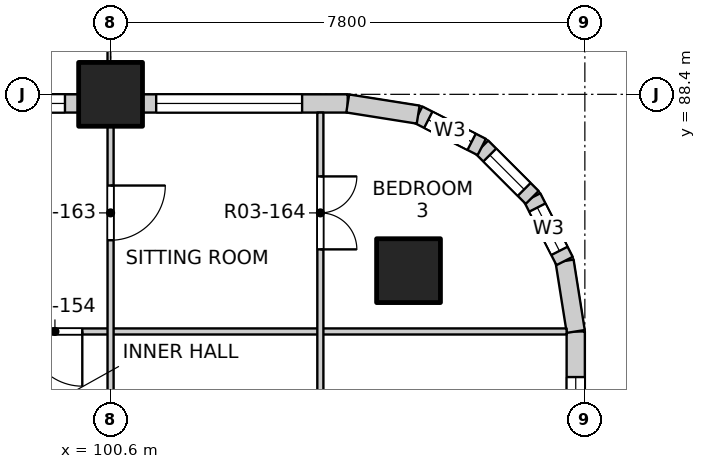
"""IFC4 building model, lengths in metres.
Left out: names, types, materials, properties, quantities, classifications, styles, units other than length and angle.
Written with IfcOpenShell. Run it as: python <this file> out.ifc"""

import sys

from ifc_helpers import new_model, si_unit, direction, frame, frame_2d, origin, origin_2d, place, context, subcontext, project, spatial, rectangle, extrude, element, fill, save


model = new_model("IFC4")
c1 = context("Model", 3, precision=1e-05, world=origin(), true_north=direction((0.0, 1.0)))
c2 = subcontext(c1, "Body", "Model", "MODEL_VIEW")
j1 = project(units=[si_unit("LENGTHUNIT", "METRE"), si_unit("PLANEANGLEUNIT", "RADIAN")], contexts=[c1])
p1 = place(None, origin())
s1 = spatial("IfcSite", under=j1, at=p1, CompositionType="ELEMENT")
p2 = place(p1, origin())
s2 = spatial("IfcBuilding", under=s1, at=p2, CompositionType="ELEMENT")
p3 = place(p2, frame((0.0, 0.0, 43.3)))
s3 = spatial("IfcBuildingStorey", under=s2, at=p3, CompositionType="ELEMENT", Elevation=43.3)
for number, where, z_axis, x_axis in (
    (1, (105.5, 85.5, -0.25), (0.0, 0.0, 1.0), (1.0, 0.0, 0.0)),
    (2, (100.6, 88.4, -0.25), (0.0, 0.0, 1.0), (1.0, 0.0, 0.0)),
):
    element("IfcColumn", number, at=place(p3, frame(where, z_axis=z_axis, x_axis=x_axis)), inside=s3, PredefinedType="COLUMN", context=c2, shape_type="SweptSolid", body=[
        extrude(rectangle(XDim=1.05, YDim=1.05, at=origin_2d()), origin(), (0.0, 0.0, 1.0), 3.35),
    ])
p4 = place(p3, frame((108.25, 81.125, 0.0), z_axis=(0.0, 0.0, 1.0), x_axis=(0.0, 1.0, 0.0)))
e3 = element("IfcWall", 3, at=p4, inside=s3, PredefinedType="SOLIDWALL", context=c2, shape_type="SweptSolid", body=[
    extrude(rectangle(XDim=3.375, YDim=0.3, at=frame_2d((1.688, 0.0))), origin(), (0.0, 0.0, 1.0), 3.1),
])
p5 = place(p4, frame((0.225, 0.0, 0.9)))
e4 = element("IfcOpeningElement", 4, at=p5, cuts=e3, PredefinedType="OPENING", context=c2, shape_type="SweptSolid", body=[
    extrude(rectangle(XDim=2.4, YDim=1.8, at=frame_2d((1.2, 0.9))), frame((0.0, 0.16, 0.0), z_axis=(0.0, -1.0, 0.0), x_axis=(1.0, 0.0, 0.0)), (0.0, 0.0, 1.0), 0.32),
])
p6 = place(p3, frame((93.325, 88.25, 0.0), z_axis=(0.0, 0.0, 1.0), x_axis=(1.0, 0.0, 0.0)))
e5 = element("IfcWall", 5, at=p6, inside=s3, PredefinedType="SOLIDWALL", context=c2, shape_type="SweptSolid", body=[
    extrude(rectangle(XDim=6.75, YDim=0.3, at=frame_2d((3.375, 0.0))), origin(), (0.0, 0.0, 1.0), 3.1),
])
p7 = place(p6, frame((0.525, 0.0, 0.0)))
e6 = element("IfcOpeningElement", 6, at=p7, cuts=e5, PredefinedType="OPENING", context=c2, shape_type="SweptSolid", body=[
    extrude(rectangle(XDim=1.8, YDim=2.4, at=frame_2d((0.9, 1.2))), frame((0.0, 0.16, 0.0), z_axis=(0.0, -1.0, 0.0), x_axis=(1.0, 0.0, 0.0)), (0.0, 0.0, 1.0), 0.32),
])
p8 = place(p6, frame((4.125, 0.0, 0.9)))
e7 = element("IfcOpeningElement", 7, at=p8, cuts=e5, PredefinedType="OPENING", context=c2, shape_type="SweptSolid", body=[
    extrude(rectangle(XDim=2.4, YDim=1.8, at=frame_2d((1.2, 0.9))), frame((0.0, 0.16, 0.0), z_axis=(0.0, -1.0, 0.0), x_axis=(1.0, 0.0, 0.0)), (0.0, 0.0, 1.0), 0.32),
])
p9 = place(p3, frame((101.125, 88.25, 0.0), z_axis=(0.0, 0.0, 1.0), x_axis=(1.0, 0.0, 0.0)))
e8 = element("IfcWall", 8, at=p9, inside=s3, PredefinedType="SOLIDWALL", context=c2, shape_type="SweptSolid", body=[
    extrude(rectangle(XDim=3.375, YDim=0.3, at=frame_2d((1.688, 0.0))), origin(), (0.0, 0.0, 1.0), 3.1),
])
p10 = place(p9, frame((0.225, 0.0, 0.9)))
e9 = element("IfcOpeningElement", 9, at=p10, cuts=e8, PredefinedType="OPENING", context=c2, shape_type="SweptSolid", body=[
    extrude(rectangle(XDim=2.4, YDim=1.8, at=frame_2d((1.2, 0.9))), frame((0.0, 0.16, 0.0), z_axis=(0.0, -1.0, 0.0), x_axis=(1.0, 0.0, 0.0)), (0.0, 0.0, 1.0), 0.32),
])
p11 = place(p3, frame((108.25, 84.5, 0.0), z_axis=(0.0, 0.0, 1.0), x_axis=(-0.156496880861, 0.987678452879, 0.0)))
e10 = element("IfcWall", 10, at=p11, inside=s3, PredefinedType="SOLIDWALL", context=c2, shape_type="SweptSolid", body=[
    extrude(rectangle(XDim=1.173, YDim=0.3, at=frame_2d((0.586, 0.0))), origin(), (0.0, 0.0, 1.0), 3.1),
])
p12 = place(p3, frame((108.066, 85.659, 0.0), z_axis=(0.0, 0.0, 1.0), x_axis=(-0.454025524128, 0.890988677504, 0.0)))
e11 = element("IfcWall", 11, at=p12, inside=s3, PredefinedType="SOLIDWALL", context=c2, shape_type="SweptSolid", body=[
    extrude(rectangle(XDim=1.173, YDim=0.3, at=frame_2d((0.587, 0.0))), origin(), (0.0, 0.0, 1.0), 3.1),
])
p13 = place(p12, frame((0.187, 0.0, 0.9)))
e12 = element("IfcOpeningElement", 12, at=p13, cuts=e11, PredefinedType="OPENING", context=c2, shape_type="SweptSolid", body=[
    extrude(rectangle(XDim=0.8, YDim=1.2, at=frame_2d((0.4, 0.6))), frame((0.0, 0.16, 0.0), z_axis=(0.0, -1.0, 0.0), x_axis=(1.0, 0.0, 0.0)), (0.0, 0.0, 1.0), 0.32),
])
p14 = place(p3, frame((107.534, 86.704, 0.0), z_axis=(0.0, 0.0, 1.0), x_axis=(-0.707106781187, 0.707106781187, 0.0)))
e13 = element("IfcWall", 13, at=p14, inside=s3, PredefinedType="SOLIDWALL", context=c2, shape_type="SweptSolid", body=[
    extrude(rectangle(XDim=1.173, YDim=0.3, at=frame_2d((0.586, 0.0))), origin(), (0.0, 0.0, 1.0), 3.1),
])
p15 = place(p14, frame((0.187, 0.0, 0.9)))
e14 = element("IfcOpeningElement", 14, at=p15, cuts=e13, PredefinedType="OPENING", context=c2, shape_type="SweptSolid", body=[
    extrude(rectangle(XDim=0.8, YDim=1.2, at=frame_2d((0.4, 0.6))), frame((0.0, 0.16, 0.0), z_axis=(0.0, -1.0, 0.0), x_axis=(1.0, 0.0, 0.0)), (0.0, 0.0, 1.0), 0.32),
])
p16 = place(p3, frame((106.704, 87.534, 0.0), z_axis=(0.0, 0.0, 1.0), x_axis=(-0.890988677504, 0.454025524128, 0.0)))
e15 = element("IfcWall", 15, at=p16, inside=s3, PredefinedType="SOLIDWALL", context=c2, shape_type="SweptSolid", body=[
    extrude(rectangle(XDim=1.173, YDim=0.3, at=frame_2d((0.587, 0.0))), origin(), (0.0, 0.0, 1.0), 3.1),
])
p17 = place(p16, frame((0.187, 0.0, 0.9)))
e16 = element("IfcOpeningElement", 16, at=p17, cuts=e15, PredefinedType="OPENING", context=c2, shape_type="SweptSolid", body=[
    extrude(rectangle(XDim=0.8, YDim=1.2, at=frame_2d((0.4, 0.6))), frame((0.0, 0.16, 0.0), z_axis=(0.0, -1.0, 0.0), x_axis=(1.0, 0.0, 0.0)), (0.0, 0.0, 1.0), 0.32),
])
p18 = place(p3, frame((105.659, 88.066, 0.0), z_axis=(0.0, 0.0, 1.0), x_axis=(-0.987678452879, 0.156496880861, 0.0)))
e17 = element("IfcWall", 17, at=p18, inside=s3, PredefinedType="SOLIDWALL", context=c2, shape_type="SweptSolid", body=[
    extrude(rectangle(XDim=1.173, YDim=0.3, at=frame_2d((0.586, 0.0))), origin(), (0.0, 0.0, 1.0), 3.1),
])
p19 = place(p3, frame((96.6, 84.5, 0.0), z_axis=(0.0, 0.0, 1.0), x_axis=(1.0, 0.0, 0.0)))
e18 = element("IfcWall", 18, at=p19, inside=s3, PredefinedType="PARTITIONING", context=c2, shape_type="SweptSolid", body=[
    extrude(rectangle(XDim=11.5, YDim=0.1, at=frame_2d((5.75, 0.0))), origin(), (0.0, 0.0, 1.0), 3.1),
])
p20 = place(p19, frame((2.635, 0.0, 0.0)))
e19 = element("IfcOpeningElement", 19, at=p20, cuts=e18, PredefinedType="OPENING", context=c2, shape_type="SweptSolid", body=[
    extrude(rectangle(XDim=0.9, YDim=2.1, at=frame_2d((0.45, 1.05))), frame((0.0, 0.06, 0.0), z_axis=(0.0, -1.0, 0.0), x_axis=(1.0, 0.0, 0.0)), (0.0, 0.0, 1.0), 0.12),
])
p21 = place(p3, frame((100.6, 41.9, 0.0), z_axis=(0.0, 0.0, 1.0), x_axis=(0.0, 1.0, 0.0)))
e20 = element("IfcWall", 20, at=p21, inside=s3, PredefinedType="PARTITIONING", context=c2, shape_type="SweptSolid", body=[
    extrude(rectangle(XDim=46.2, YDim=0.1, at=frame_2d((23.1, 0.0))), origin(), (0.0, 0.0, 1.0), 3.1),
])
p22 = place(p21, frame((1.2, 0.0, 0.0)))
e21 = element("IfcOpeningElement", 21, at=p22, cuts=e20, PredefinedType="OPENING", context=c2, shape_type="SweptSolid", body=[
    extrude(rectangle(XDim=0.9, YDim=2.1, at=frame_2d((0.45, 1.05))), frame((0.0, 0.06, 0.0), z_axis=(0.0, -1.0, 0.0), x_axis=(1.0, 0.0, 0.0)), (0.0, 0.0, 1.0), 0.12),
])
p23 = place(p21, frame((5.9, 0.0, 0.0)))
e22 = element("IfcOpeningElement", 22, at=p23, cuts=e20, PredefinedType="OPENING", context=c2, shape_type="SweptSolid", body=[
    extrude(rectangle(XDim=0.9, YDim=2.1, at=frame_2d((0.45, 1.05))), frame((0.0, 0.06, 0.0), z_axis=(0.0, -1.0, 0.0), x_axis=(1.0, 0.0, 0.0)), (0.0, 0.0, 1.0), 0.12),
])
p24 = place(p21, frame((9.0, 0.0, 0.0)))
e23 = element("IfcOpeningElement", 23, at=p24, cuts=e20, PredefinedType="OPENING", context=c2, shape_type="SweptSolid", body=[
    extrude(rectangle(XDim=0.9, YDim=2.1, at=frame_2d((0.45, 1.05))), frame((0.0, 0.06, 0.0), z_axis=(0.0, -1.0, 0.0), x_axis=(1.0, 0.0, 0.0)), (0.0, 0.0, 1.0), 0.12),
])
p25 = place(p21, frame((13.725, 0.0, 0.0)))
e24 = element("IfcOpeningElement", 24, at=p25, cuts=e20, PredefinedType="OPENING", context=c2, shape_type="SweptSolid", body=[
    extrude(rectangle(XDim=0.9, YDim=2.1, at=frame_2d((0.45, 1.05))), frame((0.0, 0.06, 0.0), z_axis=(0.0, -1.0, 0.0), x_axis=(1.0, 0.0, 0.0)), (0.0, 0.0, 1.0), 0.12),
])
p26 = place(p21, frame((17.775, 0.0, 0.0)))
e25 = element("IfcOpeningElement", 25, at=p26, cuts=e20, PredefinedType="OPENING", context=c2, shape_type="SweptSolid", body=[
    extrude(rectangle(XDim=0.9, YDim=2.1, at=frame_2d((0.45, 1.05))), frame((0.0, 0.06, 0.0), z_axis=(0.0, -1.0, 0.0), x_axis=(1.0, 0.0, 0.0)), (0.0, 0.0, 1.0), 0.12),
])
p27 = place(p21, frame((21.5, 0.0, 0.0)))
e26 = element("IfcOpeningElement", 26, at=p27, cuts=e20, PredefinedType="OPENING", context=c2, shape_type="SweptSolid", body=[
    extrude(rectangle(XDim=0.9, YDim=2.1, at=frame_2d((0.45, 1.05))), frame((0.0, 0.06, 0.0), z_axis=(0.0, -1.0, 0.0), x_axis=(1.0, 0.0, 0.0)), (0.0, 0.0, 1.0), 0.12),
])
p28 = place(p21, frame((24.6, 0.0, 0.0)))
e27 = element("IfcOpeningElement", 27, at=p28, cuts=e20, PredefinedType="OPENING", context=c2, shape_type="SweptSolid", body=[
    extrude(rectangle(XDim=0.9, YDim=2.1, at=frame_2d((0.45, 1.05))), frame((0.0, 0.06, 0.0), z_axis=(0.0, -1.0, 0.0), x_axis=(1.0, 0.0, 0.0)), (0.0, 0.0, 1.0), 0.12),
])
p29 = place(p21, frame((28.5, 0.0, 0.0)))
e28 = element("IfcOpeningElement", 28, at=p29, cuts=e20, PredefinedType="OPENING", context=c2, shape_type="SweptSolid", body=[
    extrude(rectangle(XDim=0.9, YDim=2.1, at=frame_2d((0.45, 1.05))), frame((0.0, 0.06, 0.0), z_axis=(0.0, -1.0, 0.0), x_axis=(1.0, 0.0, 0.0)), (0.0, 0.0, 1.0), 0.12),
])
p30 = place(p21, frame((33.375, 0.0, 0.0)))
e29 = element("IfcOpeningElement", 29, at=p30, cuts=e20, PredefinedType="OPENING", context=c2, shape_type="SweptSolid", body=[
    extrude(rectangle(XDim=0.9, YDim=2.1, at=frame_2d((0.45, 1.05))), frame((0.0, 0.06, 0.0), z_axis=(0.0, -1.0, 0.0), x_axis=(1.0, 0.0, 0.0)), (0.0, 0.0, 1.0), 0.12),
])
p31 = place(p21, frame((37.1, 0.0, 0.0)))
e30 = element("IfcOpeningElement", 30, at=p31, cuts=e20, PredefinedType="OPENING", context=c2, shape_type="SweptSolid", body=[
    extrude(rectangle(XDim=0.9, YDim=2.1, at=frame_2d((0.45, 1.05))), frame((0.0, 0.06, 0.0), z_axis=(0.0, -1.0, 0.0), x_axis=(1.0, 0.0, 0.0)), (0.0, 0.0, 1.0), 0.12),
])
p32 = place(p21, frame((40.2, 0.0, 0.0)))
e31 = element("IfcOpeningElement", 31, at=p32, cuts=e20, PredefinedType="OPENING", context=c2, shape_type="SweptSolid", body=[
    extrude(rectangle(XDim=0.9, YDim=2.1, at=frame_2d((0.45, 1.05))), frame((0.0, 0.06, 0.0), z_axis=(0.0, -1.0, 0.0), x_axis=(1.0, 0.0, 0.0)), (0.0, 0.0, 1.0), 0.12),
])
p33 = place(p21, frame((44.1, 0.0, 0.0)))
e32 = element("IfcOpeningElement", 32, at=p33, cuts=e20, PredefinedType="OPENING", context=c2, shape_type="SweptSolid", body=[
    extrude(rectangle(XDim=0.9, YDim=2.1, at=frame_2d((0.45, 1.05))), frame((0.0, 0.06, 0.0), z_axis=(0.0, -1.0, 0.0), x_axis=(1.0, 0.0, 0.0)), (0.0, 0.0, 1.0), 0.12),
])
p34 = place(p3, frame((104.05, 41.9, 0.0), z_axis=(0.0, 0.0, 1.0), x_axis=(0.0, 1.0, 0.0)))
e33 = element("IfcWall", 33, at=p34, inside=s3, PredefinedType="PARTITIONING", context=c2, shape_type="SweptSolid", body=[
    extrude(rectangle(XDim=46.2, YDim=0.1, at=frame_2d((23.1, 0.0))), origin(), (0.0, 0.0, 1.0), 3.1),
])
p35 = place(p34, frame((1.05, 0.0, 0.0)))
e34 = element("IfcOpeningElement", 34, at=p35, cuts=e33, PredefinedType="OPENING", context=c2, shape_type="SweptSolid", body=[
    extrude(rectangle(XDim=1.2, YDim=2.1, at=frame_2d((0.6, 1.05))), frame((0.0, 0.06, 0.0), z_axis=(0.0, -1.0, 0.0), x_axis=(1.0, 0.0, 0.0)), (0.0, 0.0, 1.0), 0.12),
])
p36 = place(p34, frame((4.125, 0.0, 0.0)))
e35 = element("IfcOpeningElement", 35, at=p36, cuts=e33, PredefinedType="OPENING", context=c2, shape_type="SweptSolid", body=[
    extrude(rectangle(XDim=0.9, YDim=2.1, at=frame_2d((0.45, 1.05))), frame((0.0, 0.06, 0.0), z_axis=(0.0, -1.0, 0.0), x_axis=(1.0, 0.0, 0.0)), (0.0, 0.0, 1.0), 0.12),
])
p37 = place(p34, frame((6.075, 0.0, 0.0)))
e36 = element("IfcOpeningElement", 36, at=p37, cuts=e33, PredefinedType="OPENING", context=c2, shape_type="SweptSolid", body=[
    extrude(rectangle(XDim=0.9, YDim=2.1, at=frame_2d((0.45, 1.05))), frame((0.0, 0.06, 0.0), z_axis=(0.0, -1.0, 0.0), x_axis=(1.0, 0.0, 0.0)), (0.0, 0.0, 1.0), 0.12),
])
p38 = place(p34, frame((8.85, 0.0, 0.0)))
e37 = element("IfcOpeningElement", 37, at=p38, cuts=e33, PredefinedType="OPENING", context=c2, shape_type="SweptSolid", body=[
    extrude(rectangle(XDim=1.2, YDim=2.1, at=frame_2d((0.6, 1.05))), frame((0.0, 0.06, 0.0), z_axis=(0.0, -1.0, 0.0), x_axis=(1.0, 0.0, 0.0)), (0.0, 0.0, 1.0), 0.12),
])
p39 = place(p34, frame((11.925, 0.0, 0.0)))
e38 = element("IfcOpeningElement", 38, at=p39, cuts=e33, PredefinedType="OPENING", context=c2, shape_type="SweptSolid", body=[
    extrude(rectangle(XDim=0.9, YDim=2.1, at=frame_2d((0.45, 1.05))), frame((0.0, 0.06, 0.0), z_axis=(0.0, -1.0, 0.0), x_axis=(1.0, 0.0, 0.0)), (0.0, 0.0, 1.0), 0.12),
])
p40 = place(p34, frame((13.875, 0.0, 0.0)))
e39 = element("IfcOpeningElement", 39, at=p40, cuts=e33, PredefinedType="OPENING", context=c2, shape_type="SweptSolid", body=[
    extrude(rectangle(XDim=0.9, YDim=2.1, at=frame_2d((0.45, 1.05))), frame((0.0, 0.06, 0.0), z_axis=(0.0, -1.0, 0.0), x_axis=(1.0, 0.0, 0.0)), (0.0, 0.0, 1.0), 0.12),
])
p41 = place(p34, frame((15.825, 0.0, 0.0)))
e40 = element("IfcOpeningElement", 40, at=p41, cuts=e33, PredefinedType="OPENING", context=c2, shape_type="SweptSolid", body=[
    extrude(rectangle(XDim=0.9, YDim=2.1, at=frame_2d((0.45, 1.05))), frame((0.0, 0.06, 0.0), z_axis=(0.0, -1.0, 0.0), x_axis=(1.0, 0.0, 0.0)), (0.0, 0.0, 1.0), 0.12),
])
p42 = place(p34, frame((17.775, 0.0, 0.0)))
e41 = element("IfcOpeningElement", 41, at=p42, cuts=e33, PredefinedType="OPENING", context=c2, shape_type="SweptSolid", body=[
    extrude(rectangle(XDim=0.9, YDim=2.1, at=frame_2d((0.45, 1.05))), frame((0.0, 0.06, 0.0), z_axis=(0.0, -1.0, 0.0), x_axis=(1.0, 0.0, 0.0)), (0.0, 0.0, 1.0), 0.12),
])
p43 = place(p34, frame((19.725, 0.0, 0.0)))
e42 = element("IfcOpeningElement", 42, at=p43, cuts=e33, PredefinedType="OPENING", context=c2, shape_type="SweptSolid", body=[
    extrude(rectangle(XDim=0.9, YDim=2.1, at=frame_2d((0.45, 1.05))), frame((0.0, 0.06, 0.0), z_axis=(0.0, -1.0, 0.0), x_axis=(1.0, 0.0, 0.0)), (0.0, 0.0, 1.0), 0.12),
])
p44 = place(p34, frame((21.675, 0.0, 0.0)))
e43 = element("IfcOpeningElement", 43, at=p44, cuts=e33, PredefinedType="OPENING", context=c2, shape_type="SweptSolid", body=[
    extrude(rectangle(XDim=0.9, YDim=2.1, at=frame_2d((0.45, 1.05))), frame((0.0, 0.06, 0.0), z_axis=(0.0, -1.0, 0.0), x_axis=(1.0, 0.0, 0.0)), (0.0, 0.0, 1.0), 0.12),
])
p45 = place(p34, frame((24.45, 0.0, 0.0)))
e44 = element("IfcOpeningElement", 44, at=p45, cuts=e33, PredefinedType="OPENING", context=c2, shape_type="SweptSolid", body=[
    extrude(rectangle(XDim=1.2, YDim=2.1, at=frame_2d((0.6, 1.05))), frame((0.0, 0.06, 0.0), z_axis=(0.0, -1.0, 0.0), x_axis=(1.0, 0.0, 0.0)), (0.0, 0.0, 1.0), 0.12),
])
p46 = place(p34, frame((28.35, 0.0, 0.0)))
e45 = element("IfcOpeningElement", 45, at=p46, cuts=e33, PredefinedType="OPENING", context=c2, shape_type="SweptSolid", body=[
    extrude(rectangle(XDim=1.2, YDim=2.1, at=frame_2d((0.6, 1.05))), frame((0.0, 0.06, 0.0), z_axis=(0.0, -1.0, 0.0), x_axis=(1.0, 0.0, 0.0)), (0.0, 0.0, 1.0), 0.12),
])
p47 = place(p34, frame((31.425, 0.0, 0.0)))
e46 = element("IfcOpeningElement", 46, at=p47, cuts=e33, PredefinedType="OPENING", context=c2, shape_type="SweptSolid", body=[
    extrude(rectangle(XDim=0.9, YDim=2.1, at=frame_2d((0.45, 1.05))), frame((0.0, 0.06, 0.0), z_axis=(0.0, -1.0, 0.0), x_axis=(1.0, 0.0, 0.0)), (0.0, 0.0, 1.0), 0.12),
])
p48 = place(p34, frame((33.375, 0.0, 0.0)))
e47 = element("IfcOpeningElement", 47, at=p48, cuts=e33, PredefinedType="OPENING", context=c2, shape_type="SweptSolid", body=[
    extrude(rectangle(XDim=0.9, YDim=2.1, at=frame_2d((0.45, 1.05))), frame((0.0, 0.06, 0.0), z_axis=(0.0, -1.0, 0.0), x_axis=(1.0, 0.0, 0.0)), (0.0, 0.0, 1.0), 0.12),
])
p49 = place(p34, frame((35.325, 0.0, 0.0)))
e48 = element("IfcOpeningElement", 48, at=p49, cuts=e33, PredefinedType="OPENING", context=c2, shape_type="SweptSolid", body=[
    extrude(rectangle(XDim=0.9, YDim=2.1, at=frame_2d((0.45, 1.05))), frame((0.0, 0.06, 0.0), z_axis=(0.0, -1.0, 0.0), x_axis=(1.0, 0.0, 0.0)), (0.0, 0.0, 1.0), 0.12),
])
p50 = place(p34, frame((37.275, 0.0, 0.0)))
e49 = element("IfcOpeningElement", 49, at=p50, cuts=e33, PredefinedType="OPENING", context=c2, shape_type="SweptSolid", body=[
    extrude(rectangle(XDim=0.9, YDim=2.1, at=frame_2d((0.45, 1.05))), frame((0.0, 0.06, 0.0), z_axis=(0.0, -1.0, 0.0), x_axis=(1.0, 0.0, 0.0)), (0.0, 0.0, 1.0), 0.12),
])
p51 = place(p34, frame((40.05, 0.0, 0.0)))
e50 = element("IfcOpeningElement", 50, at=p51, cuts=e33, PredefinedType="OPENING", context=c2, shape_type="SweptSolid", body=[
    extrude(rectangle(XDim=1.2, YDim=2.1, at=frame_2d((0.6, 1.05))), frame((0.0, 0.06, 0.0), z_axis=(0.0, -1.0, 0.0), x_axis=(1.0, 0.0, 0.0)), (0.0, 0.0, 1.0), 0.12),
])
p52 = place(p34, frame((43.95, 0.0, 0.0)))
e51 = element("IfcOpeningElement", 51, at=p52, cuts=e33, PredefinedType="OPENING", context=c2, shape_type="SweptSolid", body=[
    extrude(rectangle(XDim=1.2, YDim=2.1, at=frame_2d((0.6, 1.05))), frame((0.0, 0.06, 0.0), z_axis=(0.0, -1.0, 0.0), x_axis=(1.0, 0.0, 0.0)), (0.0, 0.0, 1.0), 0.12),
])
p53 = place(p5, origin())
e52 = element("IfcWindow", 52, at=p53, inside=s3, PartitioningType="DOUBLE_PANEL_VERTICAL", PredefinedType="WINDOW", context=c2, shape_type="SweptSolid", body=[
    extrude(rectangle(XDim=2.4, YDim=1.8, at=frame_2d((1.2, 0.9))), frame((0.0, 0.03, 0.0), z_axis=(0.0, -1.0, 0.0), x_axis=(1.0, 0.0, 0.0)), (0.0, 0.0, 1.0), 0.06),
])
fill(e4, e52)
p54 = place(p8, origin())
e53 = element("IfcWindow", 53, at=p54, inside=s3, PartitioningType="DOUBLE_PANEL_VERTICAL", PredefinedType="WINDOW", context=c2, shape_type="SweptSolid", body=[
    extrude(rectangle(XDim=2.4, YDim=1.8, at=frame_2d((1.2, 0.9))), frame((0.0, 0.03, 0.0), z_axis=(0.0, -1.0, 0.0), x_axis=(1.0, 0.0, 0.0)), (0.0, 0.0, 1.0), 0.06),
])
fill(e7, e53)
p55 = place(p10, origin())
e54 = element("IfcWindow", 54, at=p55, inside=s3, PartitioningType="DOUBLE_PANEL_VERTICAL", PredefinedType="WINDOW", context=c2, shape_type="SweptSolid", body=[
    extrude(rectangle(XDim=2.4, YDim=1.8, at=frame_2d((1.2, 0.9))), frame((0.0, 0.03, 0.0), z_axis=(0.0, -1.0, 0.0), x_axis=(1.0, 0.0, 0.0)), (0.0, 0.0, 1.0), 0.06),
])
fill(e9, e54)
p56 = place(p13, origin())
e55 = element("IfcWindow", 55, at=p56, inside=s3, PartitioningType="SINGLE_PANEL", PredefinedType="WINDOW", context=c2, shape_type="SweptSolid", body=[
    extrude(rectangle(XDim=0.8, YDim=1.2, at=frame_2d((0.4, 0.6))), frame((0.0, 0.03, 0.0), z_axis=(0.0, -1.0, 0.0), x_axis=(1.0, 0.0, 0.0)), (0.0, 0.0, 1.0), 0.06),
])
fill(e12, e55)
p57 = place(p15, origin())
e56 = element("IfcWindow", 56, at=p57, inside=s3, PartitioningType="SINGLE_PANEL", PredefinedType="WINDOW", context=c2, shape_type="SweptSolid", body=[
    extrude(rectangle(XDim=0.8, YDim=1.2, at=frame_2d((0.4, 0.6))), frame((0.0, 0.03, 0.0), z_axis=(0.0, -1.0, 0.0), x_axis=(1.0, 0.0, 0.0)), (0.0, 0.0, 1.0), 0.06),
])
fill(e14, e56)
p58 = place(p17, origin())
e57 = element("IfcWindow", 57, at=p58, inside=s3, PartitioningType="SINGLE_PANEL", PredefinedType="WINDOW", context=c2, shape_type="SweptSolid", body=[
    extrude(rectangle(XDim=0.8, YDim=1.2, at=frame_2d((0.4, 0.6))), frame((0.0, 0.03, 0.0), z_axis=(0.0, -1.0, 0.0), x_axis=(1.0, 0.0, 0.0)), (0.0, 0.0, 1.0), 0.06),
])
fill(e16, e57)
p59 = place(p20, origin())
e58 = element("IfcDoor", 58, at=p59, inside=s3, OperationType="SINGLE_SWING_LEFT", PredefinedType="DOOR", context=c2, shape_type="SweptSolid", body=[
    extrude(rectangle(XDim=0.9, YDim=2.1, at=frame_2d((0.45, 1.05))), frame((0.0, 0.025, 0.0), z_axis=(0.0, -1.0, 0.0), x_axis=(1.0, 0.0, 0.0)), (0.0, 0.0, 1.0), 0.05),
])
fill(e19, e58)
p60 = place(p33, origin())
e59 = element("IfcDoor", 59, at=p60, inside=s3, OperationType="SINGLE_SWING_LEFT", PredefinedType="DOOR", context=c2, shape_type="SweptSolid", body=[
    extrude(rectangle(XDim=0.9, YDim=2.1, at=frame_2d((0.45, 1.05))), frame((0.0, 0.025, 0.0), z_axis=(0.0, -1.0, 0.0), x_axis=(1.0, 0.0, 0.0)), (0.0, 0.0, 1.0), 0.05),
])
fill(e32, e59)
p61 = place(p52, origin())
e60 = element("IfcDoor", 60, at=p61, inside=s3, OperationType="DOUBLE_DOOR_SINGLE_SWING", PredefinedType="DOOR", context=c2, shape_type="SweptSolid", body=[
    extrude(rectangle(XDim=1.2, YDim=2.1, at=frame_2d((0.6, 1.05))), frame((0.0, 0.025, 0.0), z_axis=(0.0, -1.0, 0.0), x_axis=(1.0, 0.0, 0.0)), (0.0, 0.0, 1.0), 0.05),
])
fill(e51, e60)
save(model, sys.argv[1])
